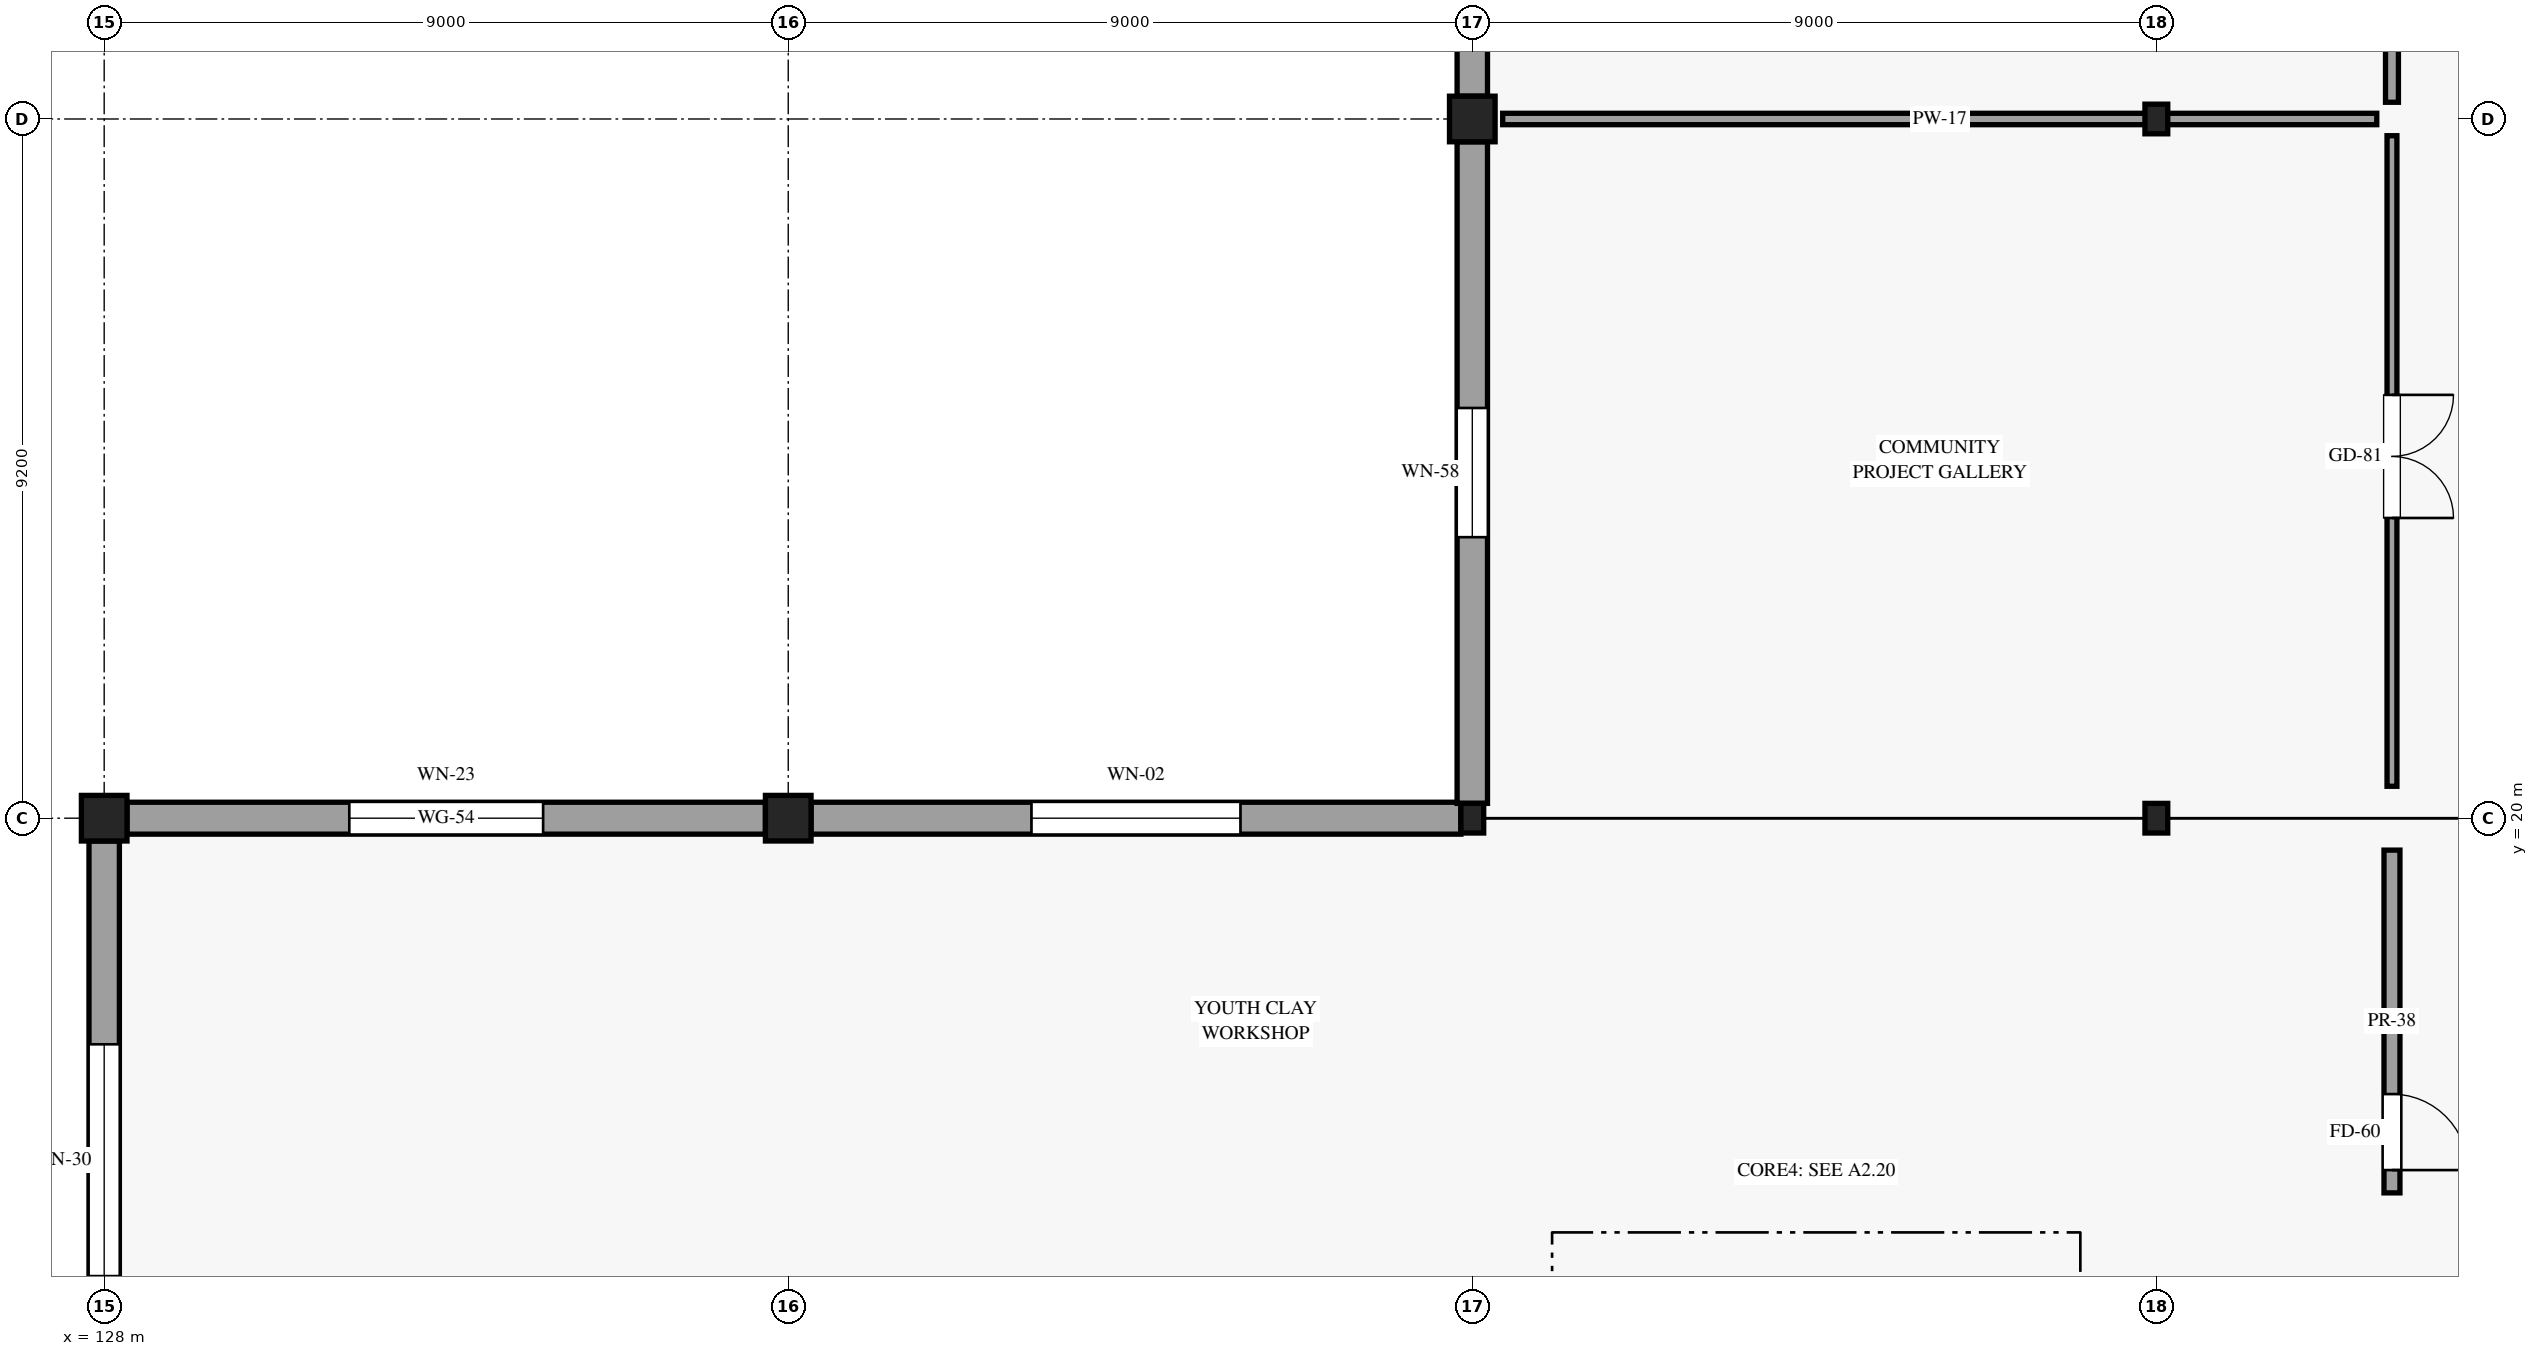
"""IFC4 building model, lengths in metres.
Left out: names, types, materials, properties, quantities, classifications, styles, units other than length and angle.
Written with IfcOpenShell. Run it as: python <this file> out.ifc"""

import sys

from ifc_helpers import new_model, si_unit, direction, frame, frame_2d, origin, origin_2d, place, context, subcontext, project, spatial, rectangle, i_section, extrude, element, fill, save


model = new_model("IFC4")
c1 = context("Model", 3, precision=1e-05, world=origin(), true_north=direction((0.0, 1.0)))
c2 = subcontext(c1, "Body", "Model", "MODEL_VIEW")
j1 = project(units=[si_unit("LENGTHUNIT", "METRE"), si_unit("PLANEANGLEUNIT", "RADIAN")], contexts=[c1])
p1 = place(None, origin())
s1 = spatial("IfcSite", under=j1, at=p1, CompositionType="ELEMENT")
p2 = place(p1, origin())
s2 = spatial("IfcBuilding", under=s1, at=p2, CompositionType="ELEMENT")
p3 = place(p2, origin())
s3 = spatial("IfcBuildingStorey", under=s2, at=p3, CompositionType="ELEMENT", Elevation=0.0)
for number, where, z_axis, x_axis in (
    (1, (128.0, 20.0, 0.0), (0.0, 0.0, 1.0), (1.0, 0.0, 0.0)),
    (2, (137.0, 20.0, 0.0), (0.0, 0.0, 1.0), (1.0, 0.0, 0.0)),
):
    element("IfcColumn", number, at=place(p3, frame(where, z_axis=z_axis, x_axis=x_axis)), inside=s3, PredefinedType="COLUMN", context=c2, shape_type="SweptSolid", body=[
        extrude(rectangle(XDim=0.6, YDim=0.6, at=origin_2d()), origin(), (0.0, 0.0, 1.0), 5.4),
    ])
p4 = place(p3, frame((146.0, 20.0, 0.0), z_axis=(0.0, 0.0, 1.0), x_axis=(1.0, 0.0, 0.0)))
e3 = element("IfcColumn", 3, at=p4, inside=s3, PredefinedType="COLUMN", context=c2, shape_type="SweptSolid", body=[
    extrude(i_section(OverallWidth=0.3, OverallDepth=0.39, WebThickness=0.011, FlangeThickness=0.019, FilletRadius=0.027, at=origin_2d()), origin(), (0.0, 0.0, 1.0), 5.4),
])
p5 = place(p3, frame((146.0, 29.2, 0.0), z_axis=(0.0, 0.0, 1.0), x_axis=(1.0, 0.0, 0.0)))
e4 = element("IfcColumn", 4, at=p5, inside=s3, PredefinedType="COLUMN", context=c2, shape_type="SweptSolid", body=[
    extrude(rectangle(XDim=0.6, YDim=0.6, at=origin_2d()), origin(), (0.0, 0.0, 1.0), 5.4),
])
for number, where, z_axis, x_axis in (
    (5, (155.0, 20.0, 0.0), (0.0, 0.0, 1.0), (1.0, 0.0, 0.0)),
    (6, (155.0, 29.2, 0.0), (0.0, 0.0, 1.0), (1.0, 0.0, 0.0)),
):
    element("IfcColumn", number, at=place(p3, frame(where, z_axis=z_axis, x_axis=x_axis)), inside=s3, PredefinedType="COLUMN", context=c2, shape_type="SweptSolid", body=[
        extrude(i_section(OverallWidth=0.3, OverallDepth=0.39, WebThickness=0.011, FlangeThickness=0.019, FilletRadius=0.027, at=origin_2d()), origin(), (0.0, 0.0, 1.0), 5.4),
    ])
p6 = place(p3, frame((128.3, 20.0, 0.0), z_axis=(0.0, 0.0, 1.0), x_axis=(1.0, 0.0, 0.0)))
e7 = element("IfcWall", 7, at=p6, inside=s3, PredefinedType="STANDARD", context=c2, shape_type="SweptSolid", body=[
    extrude(rectangle(XDim=8.4, YDim=0.42, at=frame_2d((4.2, 0.0))), origin(), (0.0, 0.0, 1.0), 4.555),
])
p7 = place(p6, frame((2.925, 0.0, 0.85)))
e8 = element("IfcOpeningElement", 8, at=p7, cuts=e7, PredefinedType="OPENING", context=c2, shape_type="SweptSolid", body=[
    extrude(rectangle(XDim=2.55, YDim=2.4, at=frame_2d((1.275, 1.2))), frame((0.0, 0.22, 0.0), z_axis=(0.0, -1.0, 0.0), x_axis=(1.0, 0.0, 0.0)), (0.0, 0.0, 1.0), 0.44),
])
p8 = place(p3, frame((137.3, 20.0, 0.0), z_axis=(0.0, 0.0, 1.0), x_axis=(1.0, 0.0, 0.0)))
e9 = element("IfcWall", 9, at=p8, inside=s3, PredefinedType="STANDARD", context=c2, shape_type="SweptSolid", body=[
    extrude(rectangle(XDim=8.55, YDim=0.42, at=frame_2d((4.275, 0.0))), origin(), (0.0, 0.0, 1.0), 4.555),
])
p9 = place(p8, frame((2.9, 0.0, 0.85)))
e10 = element("IfcOpeningElement", 10, at=p9, cuts=e9, PredefinedType="OPENING", context=c2, shape_type="SweptSolid", body=[
    extrude(rectangle(XDim=2.75, YDim=2.45, at=frame_2d((1.375, 1.225))), frame((0.0, 0.22, 0.0), z_axis=(0.0, -1.0, 0.0), x_axis=(1.0, 0.0, 0.0)), (0.0, 0.0, 1.0), 0.44),
])
p10 = place(p3, frame((128.0, 11.3, 0.0), z_axis=(0.0, 0.0, 1.0), x_axis=(0.0, 1.0, 0.0)))
e11 = element("IfcWall", 11, at=p10, inside=s3, PredefinedType="STANDARD", context=c2, shape_type="SweptSolid", body=[
    extrude(rectangle(XDim=8.4, YDim=0.4, at=frame_2d((4.2, 0.0))), origin(), (0.0, 0.0, 1.0), 4.555),
])
p11 = place(p10, frame((2.675, 0.0, 0.85)))
e12 = element("IfcOpeningElement", 12, at=p11, cuts=e11, PredefinedType="OPENING", context=c2, shape_type="SweptSolid", body=[
    extrude(rectangle(XDim=3.05, YDim=2.55, at=frame_2d((1.525, 1.275))), frame((0.0, 0.21, 0.0), z_axis=(0.0, -1.0, 0.0), x_axis=(1.0, 0.0, 0.0)), (0.0, 0.0, 1.0), 0.42),
])
p12 = place(p3, frame((146.0, 20.195, 0.0), z_axis=(0.0, 0.0, 1.0), x_axis=(0.0, 1.0, 0.0)))
e13 = element("IfcWall", 13, at=p12, inside=s3, PredefinedType="STANDARD", context=c2, shape_type="SweptSolid", body=[
    extrude(rectangle(XDim=8.705, YDim=0.4, at=frame_2d((4.353, 0.0))), origin(), (0.0, 0.0, 1.0), 4.555),
])
p13 = place(p12, frame((3.502, 0.0, 0.85)))
e14 = element("IfcOpeningElement", 14, at=p13, cuts=e13, PredefinedType="OPENING", context=c2, shape_type="SweptSolid", body=[
    extrude(rectangle(XDim=1.7, YDim=2.3, at=frame_2d((0.85, 1.15))), frame((0.0, 0.21, 0.0), z_axis=(0.0, -1.0, 0.0), x_axis=(1.0, 0.0, 0.0)), (0.0, 0.0, 1.0), 0.42),
])
p14 = place(p3, frame((146.0, 29.5, 0.0), z_axis=(0.0, 0.0, 1.0), x_axis=(0.0, 1.0, 0.0)))
e15 = element("IfcWall", 15, at=p14, inside=s3, PredefinedType="STANDARD", context=c2, shape_type="SweptSolid", body=[
    extrude(rectangle(XDim=8.6, YDim=0.4, at=frame_2d((4.3, 0.0))), origin(), (0.0, 0.0, 1.0), 4.555),
])
p15 = place(p14, frame((3.25, 0.0, 0.85)))
e16 = element("IfcOpeningElement", 16, at=p15, cuts=e15, PredefinedType="OPENING", context=c2, shape_type="SweptSolid", body=[
    extrude(rectangle(XDim=2.1, YDim=2.45, at=frame_2d((1.05, 1.225))), frame((0.0, 0.21, 0.0), z_axis=(0.0, -1.0, 0.0), x_axis=(1.0, 0.0, 0.0)), (0.0, 0.0, 1.0), 0.42),
])
p16 = place(p3, frame((158.1, 15.07, 0.0), z_axis=(0.0, 0.0, 1.0), x_axis=(0.0, 1.0, 0.0)))
e17 = element("IfcWall", 17, at=p16, inside=s3, PredefinedType="PARTITIONING", context=c2, shape_type="SweptSolid", body=[
    extrude(rectangle(XDim=4.51, YDim=0.21, at=frame_2d((2.255, 0.0))), origin(), (0.0, 0.0, 1.0), 4.715),
])
p17 = place(p16, frame((1.3, 0.0, 0.0), z_axis=(0.0, 0.0, 1.0), x_axis=(-1.0, 0.0, 0.0)))
e18 = element("IfcOpeningElement", 18, at=p17, cuts=e17, PredefinedType="OPENING", context=c2, shape_type="SweptSolid", body=[
    extrude(rectangle(XDim=1.0, YDim=2.2, at=frame_2d((0.5, 1.1))), frame((0.0, 0.115, 0.0), z_axis=(0.0, -1.0, 0.0), x_axis=(1.0, 0.0, 0.0)), (0.0, 0.0, 1.0), 0.23),
])
p18 = place(p3, frame((158.1, 20.42, 0.0), z_axis=(0.0, 0.0, 1.0), x_axis=(0.0, 1.0, 0.0)))
e19 = element("IfcWall", 19, at=p18, inside=s3, PredefinedType="PARTITIONING", context=c2, shape_type="SweptSolid", body=[
    extrude(rectangle(XDim=8.56, YDim=0.13, at=frame_2d((4.28, 0.0))), origin(), (0.0, 0.0, 1.0), 4.555),
])
p19 = place(p18, frame((5.15, 0.0, 0.0), z_axis=(0.0, 0.0, 1.0), x_axis=(-1.0, 0.0, 0.0)))
e20 = element("IfcOpeningElement", 20, at=p19, cuts=e19, PredefinedType="OPENING", context=c2, shape_type="SweptSolid", body=[
    extrude(rectangle(XDim=1.62, YDim=2.4, at=frame_2d((0.81, 1.2))), frame((0.0, 0.075, 0.0), z_axis=(0.0, -1.0, 0.0), x_axis=(1.0, 0.0, 0.0)), (0.0, 0.0, 1.0), 0.15),
])
p20 = place(p3, frame((146.4, 29.2, 0.0), z_axis=(0.0, 0.0, 1.0), x_axis=(1.0, 0.0, 0.0)))
e21 = element("IfcWall", 21, at=p20, inside=s3, PredefinedType="PARTITIONING", context=c2, shape_type="SweptSolid", body=[
    extrude(rectangle(XDim=11.5, YDim=0.15, at=frame_2d((5.75, 0.0))), origin(), (0.0, 0.0, 1.0), 4.555),
])
p21 = place(p3, frame((158.1, 29.42, 0.0), z_axis=(0.0, 0.0, 1.0), x_axis=(0.0, 1.0, 0.0)))
e22 = element("IfcWall", 22, at=p21, inside=s3, PredefinedType="PARTITIONING", context=c2, shape_type="SweptSolid", body=[
    extrude(rectangle(XDim=17.64, YDim=0.17, at=frame_2d((8.82, 0.0))), origin(), (0.0, 0.0, 1.0), 4.555),
])
p22 = place(p21, frame((5.069, 0.0, 0.0), z_axis=(0.0, 0.0, 1.0), x_axis=(-1.0, 0.0, 0.0)))
e23 = element("IfcOpeningElement", 23, at=p22, cuts=e22, PredefinedType="OPENING", context=c2, shape_type="SweptSolid", body=[
    extrude(rectangle(XDim=1.16, YDim=2.28, at=frame_2d((0.58, 1.14))), frame((0.0, 0.095, 0.0), z_axis=(0.0, -1.0, 0.0), x_axis=(1.0, 0.0, 0.0)), (0.0, 0.0, 1.0), 0.19),
])
p23 = place(p7, origin())
e24 = element("IfcWindow", 24, at=p23, inside=s3, PartitioningType="SINGLE_PANEL", PredefinedType="WINDOW", context=c2, shape_type="SweptSolid", body=[
    extrude(rectangle(XDim=2.55, YDim=2.4, at=frame_2d((1.275, 1.2))), frame((0.0, 0.03, 0.0), z_axis=(0.0, -1.0, 0.0), x_axis=(1.0, 0.0, 0.0)), (0.0, 0.0, 1.0), 0.06),
])
fill(e8, e24)
p24 = place(p9, origin())
e25 = element("IfcWindow", 25, at=p24, inside=s3, PartitioningType="SINGLE_PANEL", PredefinedType="WINDOW", context=c2, shape_type="SweptSolid", body=[
    extrude(rectangle(XDim=2.75, YDim=2.45, at=frame_2d((1.375, 1.225))), frame((0.0, 0.03, 0.0), z_axis=(0.0, -1.0, 0.0), x_axis=(1.0, 0.0, 0.0)), (0.0, 0.0, 1.0), 0.06),
])
fill(e10, e25)
p25 = place(p11, origin())
e26 = element("IfcWindow", 26, at=p25, inside=s3, PartitioningType="SINGLE_PANEL", PredefinedType="WINDOW", context=c2, shape_type="SweptSolid", body=[
    extrude(rectangle(XDim=3.05, YDim=2.55, at=frame_2d((1.525, 1.275))), frame((0.0, 0.03, 0.0), z_axis=(0.0, -1.0, 0.0), x_axis=(1.0, 0.0, 0.0)), (0.0, 0.0, 1.0), 0.06),
])
fill(e12, e26)
p26 = place(p13, origin())
e27 = element("IfcWindow", 27, at=p26, inside=s3, PartitioningType="SINGLE_PANEL", PredefinedType="WINDOW", context=c2, shape_type="SweptSolid", body=[
    extrude(rectangle(XDim=1.7, YDim=2.3, at=frame_2d((0.85, 1.15))), frame((0.0, 0.03, 0.0), z_axis=(0.0, -1.0, 0.0), x_axis=(1.0, 0.0, 0.0)), (0.0, 0.0, 1.0), 0.06),
])
fill(e14, e27)
p27 = place(p17, origin())
e28 = element("IfcDoor", 28, at=p27, inside=s3, OperationType="SINGLE_SWING_RIGHT", PredefinedType="DOOR", context=c2, shape_type="SweptSolid", body=[
    extrude(rectangle(XDim=1.0, YDim=2.2, at=frame_2d((0.5, 1.1))), frame((0.0, 0.025, 0.0), z_axis=(0.0, -1.0, 0.0), x_axis=(1.0, 0.0, 0.0)), (0.0, 0.0, 1.0), 0.05),
])
fill(e18, e28)
p28 = place(p19, origin())
e29 = element("IfcDoor", 29, at=p28, inside=s3, OperationType="DOUBLE_DOOR_SINGLE_SWING", PredefinedType="DOOR", context=c2, shape_type="SweptSolid", body=[
    extrude(rectangle(XDim=1.62, YDim=2.4, at=frame_2d((0.81, 1.2))), frame((0.0, 0.025, 0.0), z_axis=(0.0, -1.0, 0.0), x_axis=(1.0, 0.0, 0.0)), (0.0, 0.0, 1.0), 0.05),
])
fill(e20, e29)
save(model, sys.argv[1])
